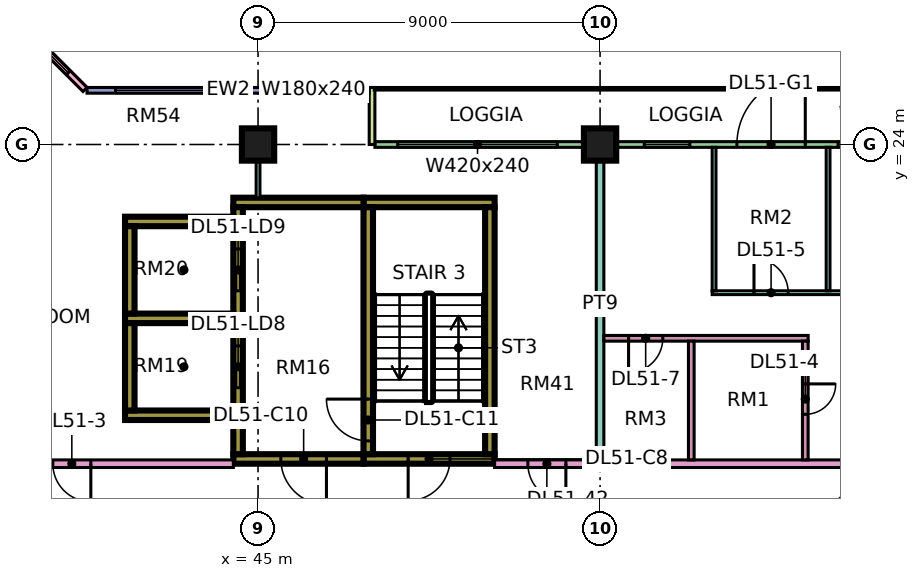
"""IFC4 building model, lengths in metres.
Left out: names, types, materials, properties, quantities, classifications, styles, units other than length and angle.
Written with IfcOpenShell. Run it as: python <this file> out.ifc"""

import sys

from ifc_helpers import new_model, si_unit, direction, frame, frame_2d, origin, origin_2d, place, context, subcontext, project, spatial, rectangle, extrude, element, fill, save


model = new_model("IFC4")
c1 = context("Model", 3, precision=1e-05, world=origin(), true_north=direction((0.0, 1.0)))
c2 = subcontext(c1, "Body", "Model", "MODEL_VIEW")
j1 = project(units=[si_unit("LENGTHUNIT", "METRE"), si_unit("PLANEANGLEUNIT", "RADIAN")], contexts=[c1])
p1 = place(None, origin())
s1 = spatial("IfcSite", under=j1, at=p1, CompositionType="ELEMENT")
p2 = place(p1, origin())
s2 = spatial("IfcBuilding", under=s1, at=p2, CompositionType="ELEMENT")
p3 = place(p2, frame((0.0, 0.0, 219.15)))
s3 = spatial("IfcBuildingStorey", under=s2, at=p3, CompositionType="ELEMENT", Elevation=219.15)
for number, where, z_axis, x_axis in (
    (1, (45.0, 24.0, 0.0), (0.0, 0.0, 1.0), (1.0, 0.0, 0.0)),
    (2, (54.0, 24.0, 0.0), (0.0, 0.0, 1.0), (1.0, 0.0, 0.0)),
):
    element("IfcColumn", number, at=place(p3, frame(where, z_axis=z_axis, x_axis=x_axis)), inside=s3, PredefinedType="COLUMN", context=c2, shape_type="SweptSolid", body=[
        extrude(rectangle(XDim=0.85, YDim=0.85, at=origin_2d()), origin(), (0.0, 0.0, 1.0), 3.75),
    ])
p4 = place(p3, frame((47.775, 15.725, 0.0), z_axis=(0.0, 0.0, 1.0), x_axis=(1.0, 0.0, 0.0)))
e3 = element("IfcWall", 3, at=p4, inside=s3, PredefinedType="SHEAR", context=c2, shape_type="SweptSolid", body=[
    extrude(rectangle(XDim=3.45, YDim=0.25, at=frame_2d((1.725, 0.0))), origin(), (0.0, 0.0, 1.0), 3.75),
])
p5 = place(p4, frame((1.175, 0.0, 0.0)))
e4 = element("IfcOpeningElement", 4, at=p5, cuts=e3, PredefinedType="OPENING", context=c2, shape_type="SweptSolid", body=[
    extrude(rectangle(XDim=1.1, YDim=2.2, at=frame_2d((0.55, 1.1))), frame((0.0, 0.135, 0.0), z_axis=(0.0, -1.0, 0.0), x_axis=(1.0, 0.0, 0.0)), (0.0, 0.0, 1.0), 0.27),
])
p6 = place(p3, frame((47.775, 22.475, 0.0), z_axis=(0.0, 0.0, 1.0), x_axis=(1.0, 0.0, 0.0)))
e5 = element("IfcWall", 5, at=p6, inside=s3, PredefinedType="SHEAR", context=c2, shape_type="SweptSolid", body=[
    extrude(rectangle(XDim=3.45, YDim=0.25, at=frame_2d((1.725, 0.0))), origin(), (0.0, 0.0, 1.0), 3.75),
])
p7 = place(p3, frame((47.9, 15.85, 0.0), z_axis=(0.0, 0.0, 1.0), x_axis=(0.0, 1.0, 0.0)))
e6 = element("IfcWall", 6, at=p7, inside=s3, PredefinedType="SHEAR", context=c2, shape_type="SweptSolid", body=[
    extrude(rectangle(XDim=6.5, YDim=0.25, at=frame_2d((3.25, 0.0))), origin(), (0.0, 0.0, 1.0), 3.75),
])
p8 = place(p7, frame((0.35, 0.0, 0.0)))
e7 = element("IfcOpeningElement", 7, at=p8, cuts=e6, PredefinedType="OPENING", context=c2, shape_type="SweptSolid", body=[
    extrude(rectangle(XDim=1.1, YDim=2.2, at=frame_2d((0.55, 1.1))), frame((0.0, 0.135, 0.0), z_axis=(0.0, -1.0, 0.0), x_axis=(1.0, 0.0, 0.0)), (0.0, 0.0, 1.0), 0.27),
])
p9 = place(p3, frame((51.1, 15.85, 0.0), z_axis=(0.0, 0.0, 1.0), x_axis=(0.0, 1.0, 0.0)))
e8 = element("IfcWall", 8, at=p9, inside=s3, PredefinedType="SHEAR", context=c2, shape_type="SweptSolid", body=[
    extrude(rectangle(XDim=6.5, YDim=0.25, at=frame_2d((3.25, 0.0))), origin(), (0.0, 0.0, 1.0), 3.75),
])
p10 = place(p3, frame((44.35, 15.725, 0.0), z_axis=(0.0, 0.0, 1.0), x_axis=(1.0, 0.0, 0.0)))
e9 = element("IfcWall", 9, at=p10, inside=s3, PredefinedType="SHEAR", context=c2, shape_type="SweptSolid", body=[
    extrude(rectangle(XDim=3.425, YDim=0.25, at=frame_2d((1.712, 0.0))), origin(), (0.0, 0.0, 1.0), 3.75),
])
p11 = place(p10, frame((1.25, 0.0, 0.0)))
e10 = element("IfcOpeningElement", 10, at=p11, cuts=e9, PredefinedType="OPENING", context=c2, shape_type="SweptSolid", body=[
    extrude(rectangle(XDim=1.2, YDim=2.2, at=frame_2d((0.6, 1.1))), frame((0.0, 0.135, 0.0), z_axis=(0.0, -1.0, 0.0), x_axis=(1.0, 0.0, 0.0)), (0.0, 0.0, 1.0), 0.27),
])
p12 = place(p3, frame((44.35, 22.475, 0.0), z_axis=(0.0, 0.0, 1.0), x_axis=(1.0, 0.0, 0.0)))
e11 = element("IfcWall", 11, at=p12, inside=s3, PredefinedType="SHEAR", context=c2, shape_type="SweptSolid", body=[
    extrude(rectangle(XDim=3.425, YDim=0.25, at=frame_2d((1.712, 0.0))), origin(), (0.0, 0.0, 1.0), 3.75),
])
p13 = place(p3, frame((44.475, 15.85, 0.0), z_axis=(0.0, 0.0, 1.0), x_axis=(0.0, 1.0, 0.0)))
e12 = element("IfcWall", 12, at=p13, inside=s3, PredefinedType="SHEAR", context=c2, shape_type="SweptSolid", body=[
    extrude(rectangle(XDim=6.5, YDim=0.25, at=frame_2d((3.25, 0.0))), origin(), (0.0, 0.0, 1.0), 3.75),
])
p14 = place(p13, frame((1.75, 0.0, 0.0)))
e13 = element("IfcOpeningElement", 13, at=p14, cuts=e12, PredefinedType="OPENING", context=c2, shape_type="SweptSolid", body=[
    extrude(rectangle(XDim=1.1, YDim=2.2, at=frame_2d((0.55, 1.1))), frame((0.0, 0.135, 0.0), z_axis=(0.0, -1.0, 0.0), x_axis=(1.0, 0.0, 0.0)), (0.0, 0.0, 1.0), 0.27),
])
p15 = place(p13, frame((4.3, 0.0, 0.0)))
e14 = element("IfcOpeningElement", 14, at=p15, cuts=e12, PredefinedType="OPENING", context=c2, shape_type="SweptSolid", body=[
    extrude(rectangle(XDim=1.1, YDim=2.2, at=frame_2d((0.55, 1.1))), frame((0.0, 0.135, 0.0), z_axis=(0.0, -1.0, 0.0), x_axis=(1.0, 0.0, 0.0)), (0.0, 0.0, 1.0), 0.27),
])
for number, where, z_axis, x_axis in (
    (15, (41.5, 16.875, 0.0), (0.0, 0.0, 1.0), (1.0, 0.0, 0.0)),
    (16, (41.5, 19.425, 0.0), (0.0, 0.0, 1.0), (1.0, 0.0, 0.0)),
    (17, (41.5, 21.975, 0.0), (0.0, 0.0, 1.0), (1.0, 0.0, 0.0)),
):
    element("IfcWall", number, at=place(p3, frame(where, z_axis=z_axis, x_axis=x_axis)), inside=s3, PredefinedType="SHEAR", context=c2, shape_type="SweptSolid", body=[
        extrude(rectangle(XDim=2.85, YDim=0.25, at=frame_2d((1.425, 0.0))), origin(), (0.0, 0.0, 1.0), 3.75),
    ])
for number, where, z_axis, x_axis in (
    (18, (41.625, 17.0, 0.0), (0.0, 0.0, 1.0), (0.0, 1.0, 0.0)),
    (19, (41.625, 19.55, 0.0), (0.0, 0.0, 1.0), (0.0, 1.0, 0.0)),
):
    element("IfcWall", number, at=place(p3, frame(where, z_axis=z_axis, x_axis=x_axis)), inside=s3, PredefinedType="SHEAR", context=c2, shape_type="SweptSolid", body=[
        extrude(rectangle(XDim=2.3, YDim=0.25, at=frame_2d((1.15, 0.0))), origin(), (0.0, 0.0, 1.0), 3.75),
    ])
p16 = place(p3, frame((61.425, 24.0, 0.0), z_axis=(0.0, 0.0, 1.0), x_axis=(-1.0, 0.0, 0.0)))
e20 = element("IfcWall", 20, at=p16, inside=s3, PredefinedType="SOLIDWALL", context=c2, shape_type="SweptSolid", body=[
    extrude(rectangle(XDim=13.35, YDim=0.15, at=frame_2d((6.675, 0.0))), origin(), (0.0, 0.0, 1.0), 3.35),
])
p17 = place(p16, frame((0.262, 0.0, 0.45)))
e21 = element("IfcOpeningElement", 21, at=p17, cuts=e20, PredefinedType="OPENING", context=c2, shape_type="SweptSolid", body=[
    extrude(rectangle(XDim=0.9, YDim=2.4, at=frame_2d((0.45, 1.2))), frame((0.0, 0.085, 0.0), z_axis=(0.0, -1.0, 0.0), x_axis=(1.0, 0.0, 0.0)), (0.0, 0.0, 1.0), 0.17),
])
p18 = place(p16, frame((2.025, 0.0, 0.0)))
e22 = element("IfcOpeningElement", 22, at=p18, cuts=e20, PredefinedType="OPENING", context=c2, shape_type="SweptSolid", body=[
    extrude(rectangle(XDim=1.8, YDim=2.4, at=frame_2d((0.9, 1.2))), frame((0.0, 0.085, 0.0), z_axis=(0.0, -1.0, 0.0), x_axis=(1.0, 0.0, 0.0)), (0.0, 0.0, 1.0), 0.17),
])
p19 = place(p16, frame((5.062, 0.0, 0.45)))
e23 = element("IfcOpeningElement", 23, at=p19, cuts=e20, PredefinedType="OPENING", context=c2, shape_type="SweptSolid", body=[
    extrude(rectangle(XDim=1.2, YDim=2.4, at=frame_2d((0.6, 1.2))), frame((0.0, 0.085, 0.0), z_axis=(0.0, -1.0, 0.0), x_axis=(1.0, 0.0, 0.0)), (0.0, 0.0, 1.0), 0.17),
])
p20 = place(p16, frame((8.55, 0.0, 0.45)))
e24 = element("IfcOpeningElement", 24, at=p20, cuts=e20, PredefinedType="OPENING", context=c2, shape_type="SweptSolid", body=[
    extrude(rectangle(XDim=4.2, YDim=2.4, at=frame_2d((2.1, 1.2))), frame((0.0, 0.085, 0.0), z_axis=(0.0, -1.0, 0.0), x_axis=(1.0, 0.0, 0.0)), (0.0, 0.0, 1.0), 0.17),
])
p21 = place(p3, frame((48.0, 25.5, 0.0), z_axis=(0.0, 0.0, 1.0), x_axis=(0.0, -1.0, 0.0)))
e25 = element("IfcWall", 25, at=p21, inside=s3, PredefinedType="SOLIDWALL", context=c2, shape_type="SweptSolid", body=[
    extrude(rectangle(XDim=1.5, YDim=0.15, at=frame_2d((0.75, 0.0))), origin(), (0.0, 0.0, 1.0), 3.35),
])
p22 = place(p3, frame((47.925, 25.425, 0.0), z_axis=(0.0, 0.0, 1.0), x_axis=(-1.0, 0.0, 0.0)))
e26 = element("IfcWall", 26, at=p22, inside=s3, PredefinedType="SOLIDWALL", context=c2, shape_type="SweptSolid", body=[
    extrude(rectangle(XDim=7.425, YDim=0.15, at=frame_2d((3.712, 0.0))), origin(), (0.0, 0.0, 1.0), 3.35),
])
p23 = place(p22, frame((0.562, 0.0, 0.45)))
e27 = element("IfcOpeningElement", 27, at=p23, cuts=e26, PredefinedType="OPENING", context=c2, shape_type="SweptSolid", body=[
    extrude(rectangle(XDim=1.8, YDim=2.4, at=frame_2d((0.9, 1.2))), frame((0.0, 0.085, 0.0), z_axis=(0.0, -1.0, 0.0), x_axis=(1.0, 0.0, 0.0)), (0.0, 0.0, 1.0), 0.17),
])
p24 = place(p22, frame((3.675, 0.0, 0.45)))
e28 = element("IfcOpeningElement", 28, at=p24, cuts=e26, PredefinedType="OPENING", context=c2, shape_type="SweptSolid", body=[
    extrude(rectangle(XDim=3.0, YDim=2.4, at=frame_2d((1.5, 1.2))), frame((0.0, 0.085, 0.0), z_axis=(0.0, -1.0, 0.0), x_axis=(1.0, 0.0, 0.0)), (0.0, 0.0, 1.0), 0.17),
])
p25 = place(p3, frame((40.447, 25.447, 0.0), z_axis=(0.0, 0.0, 1.0), x_axis=(-0.707106781187, 0.707106781187, 0.0)))
e29 = element("IfcWall", 29, at=p25, inside=s3, PredefinedType="SOLIDWALL", context=c2, shape_type="SweptSolid", body=[
    extrude(rectangle(XDim=4.243, YDim=0.15, at=frame_2d((2.121, 0.0))), origin(), (0.0, 0.0, 1.0), 3.35),
])
p26 = place(p25, frame((0.621, 0.0, 0.45)))
e30 = element("IfcOpeningElement", 30, at=p26, cuts=e29, PredefinedType="OPENING", context=c2, shape_type="SweptSolid", body=[
    extrude(rectangle(XDim=3.0, YDim=2.4, at=frame_2d((1.5, 1.2))), frame((0.0, 0.085, 0.0), z_axis=(0.0, -1.0, 0.0), x_axis=(1.0, 0.0, 0.0)), (0.0, 0.0, 1.0), 0.17),
])
p27 = place(p3, frame((34.0, 15.6, 0.0), z_axis=(0.0, 0.0, 1.0), x_axis=(1.0, 0.0, 0.0)))
e31 = element("IfcWall", 31, at=p27, inside=s3, PredefinedType="PARTITIONING", context=c2, shape_type="SweptSolid", body=[
    extrude(rectangle(XDim=10.35, YDim=0.2, at=frame_2d((5.175, 0.0))), origin(), (0.0, 0.0, 1.0), 3.35),
])
p28 = place(p27, frame((5.6, 0.0, 0.0)))
e32 = element("IfcOpeningElement", 32, at=p28, cuts=e31, PredefinedType="OPENING", context=c2, shape_type="SweptSolid", body=[
    extrude(rectangle(XDim=1.0, YDim=2.1, at=frame_2d((0.5, 1.05))), frame((0.0, 0.11, 0.0), z_axis=(0.0, -1.0, 0.0), x_axis=(1.0, 0.0, 0.0)), (0.0, 0.0, 1.0), 0.22),
])
p29 = place(p27, frame((0.45, 0.0, 0.0)))
e33 = element("IfcOpeningElement", 33, at=p29, cuts=e31, PredefinedType="OPENING", context=c2, shape_type="SweptSolid", body=[
    extrude(rectangle(XDim=1.2, YDim=2.1, at=frame_2d((0.6, 1.05))), frame((0.0, 0.11, 0.0), z_axis=(0.0, -1.0, 0.0), x_axis=(1.0, 0.0, 0.0)), (0.0, 0.0, 1.0), 0.22),
])
p30 = place(p3, frame((45.0, 22.6, 0.0), z_axis=(0.0, 0.0, 1.0), x_axis=(0.0, 1.0, 0.0)))
e34 = element("IfcWall", 34, at=p30, inside=s3, PredefinedType="PARTITIONING", context=c2, shape_type="SweptSolid", body=[
    extrude(rectangle(XDim=1.4, YDim=0.1, at=frame_2d((0.7, 0.0))), origin(), (0.0, 0.0, 1.0), 3.35),
])
p31 = place(p3, frame((51.225, 15.6, 0.0), z_axis=(0.0, 0.0, 1.0), x_axis=(1.0, 0.0, 0.0)))
e35 = element("IfcWall", 35, at=p31, inside=s3, PredefinedType="PARTITIONING", context=c2, shape_type="SweptSolid", body=[
    extrude(rectangle(XDim=13.125, YDim=0.2, at=frame_2d((6.562, 0.0))), origin(), (0.0, 0.0, 1.0), 3.35),
])
p32 = place(p31, frame((9.425, 0.0, 0.0)))
e36 = element("IfcOpeningElement", 36, at=p32, cuts=e35, PredefinedType="OPENING", context=c2, shape_type="SweptSolid", body=[
    extrude(rectangle(XDim=1.0, YDim=2.1, at=frame_2d((0.5, 1.05))), frame((0.0, 0.11, 0.0), z_axis=(0.0, -1.0, 0.0), x_axis=(1.0, 0.0, 0.0)), (0.0, 0.0, 1.0), 0.22),
])
p33 = place(p31, frame((0.875, 0.0, 0.0)))
e37 = element("IfcOpeningElement", 37, at=p33, cuts=e35, PredefinedType="OPENING", context=c2, shape_type="SweptSolid", body=[
    extrude(rectangle(XDim=1.0, YDim=2.1, at=frame_2d((0.5, 1.05))), frame((0.0, 0.11, 0.0), z_axis=(0.0, -1.0, 0.0), x_axis=(1.0, 0.0, 0.0)), (0.0, 0.0, 1.0), 0.22),
])
p34 = place(p3, frame((54.0, 15.7, 0.0), z_axis=(0.0, 0.0, 1.0), x_axis=(0.0, 1.0, 0.0)))
e38 = element("IfcWall", 38, at=p34, inside=s3, PredefinedType="PARTITIONING", context=c2, shape_type="SweptSolid", body=[
    extrude(rectangle(XDim=8.226, YDim=0.2, at=frame_2d((4.113, 0.0))), origin(), (0.0, 0.0, 1.0), 3.35),
])
p35 = place(p3, frame((54.1, 18.9, 0.0), z_axis=(0.0, 0.0, 1.0), x_axis=(1.0, 0.0, 0.0)))
e39 = element("IfcWall", 39, at=p35, inside=s3, PredefinedType="PARTITIONING", context=c2, shape_type="SweptSolid", body=[
    extrude(rectangle(XDim=5.375, YDim=0.15, at=frame_2d((2.688, 0.0))), origin(), (0.0, 0.0, 1.0), 3.35),
])
p36 = place(p35, frame((0.65, 0.0, 0.0)))
e40 = element("IfcOpeningElement", 40, at=p36, cuts=e39, PredefinedType="OPENING", context=c2, shape_type="SweptSolid", body=[
    extrude(rectangle(XDim=0.9, YDim=2.1, at=frame_2d((0.45, 1.05))), frame((0.0, 0.085, 0.0), z_axis=(0.0, -1.0, 0.0), x_axis=(1.0, 0.0, 0.0)), (0.0, 0.0, 1.0), 0.17),
])
p37 = place(p3, frame((56.4, 15.7, 0.0), z_axis=(0.0, 0.0, 1.0), x_axis=(0.0, 1.0, 0.0)))
e41 = element("IfcWall", 41, at=p37, inside=s3, PredefinedType="PARTITIONING", context=c2, shape_type="SweptSolid", body=[
    extrude(rectangle(XDim=3.125, YDim=0.15, at=frame_2d((1.562, 0.0))), origin(), (0.0, 0.0, 1.0), 3.35),
])
p38 = place(p3, frame((56.95, 20.1, 0.0), z_axis=(0.0, 0.0, 1.0), x_axis=(1.0, 0.0, 0.0)))
e42 = element("IfcWall", 42, at=p38, inside=s3, PredefinedType="PARTITIONING", context=c2, shape_type="SweptSolid", body=[
    extrude(rectangle(XDim=7.4, YDim=0.1, at=frame_2d((3.7, 0.0))), origin(), (0.0, 0.0, 1.0), 3.35),
])
p39 = place(p38, frame((1.1, 0.0, 0.0)))
e43 = element("IfcOpeningElement", 43, at=p39, cuts=e42, PredefinedType="OPENING", context=c2, shape_type="SweptSolid", body=[
    extrude(rectangle(XDim=0.9, YDim=2.1, at=frame_2d((0.45, 1.05))), frame((0.0, 0.06, 0.0), z_axis=(0.0, -1.0, 0.0), x_axis=(1.0, 0.0, 0.0)), (0.0, 0.0, 1.0), 0.12),
])
p40 = place(p38, frame((4.1, 0.0, 0.0)))
e44 = element("IfcOpeningElement", 44, at=p40, cuts=e42, PredefinedType="OPENING", context=c2, shape_type="SweptSolid", body=[
    extrude(rectangle(XDim=0.9, YDim=2.1, at=frame_2d((0.45, 1.05))), frame((0.0, 0.06, 0.0), z_axis=(0.0, -1.0, 0.0), x_axis=(1.0, 0.0, 0.0)), (0.0, 0.0, 1.0), 0.12),
])
p41 = place(p3, frame((57.0, 20.15, 0.0), z_axis=(0.0, 0.0, 1.0), x_axis=(0.0, 1.0, 0.0)))
e45 = element("IfcWall", 45, at=p41, inside=s3, PredefinedType="PARTITIONING", context=c2, shape_type="SweptSolid", body=[
    extrude(rectangle(XDim=3.776, YDim=0.1, at=frame_2d((1.888, 0.0))), origin(), (0.0, 0.0, 1.0), 3.35),
])
p42 = place(p3, frame((59.4, 15.7, 0.0), z_axis=(0.0, 0.0, 1.0), x_axis=(0.0, 1.0, 0.0)))
e46 = element("IfcWall", 46, at=p42, inside=s3, PredefinedType="PARTITIONING", context=c2, shape_type="SweptSolid", body=[
    extrude(rectangle(XDim=3.125, YDim=0.15, at=frame_2d((1.562, 0.0))), origin(), (0.0, 0.0, 1.0), 3.35),
])
p43 = place(p42, frame((1.2, 0.0, 0.0)))
e47 = element("IfcOpeningElement", 47, at=p43, cuts=e46, PredefinedType="OPENING", context=c2, shape_type="SweptSolid", body=[
    extrude(rectangle(XDim=0.8, YDim=2.1, at=frame_2d((0.4, 1.05))), frame((0.0, 0.085, 0.0), z_axis=(0.0, -1.0, 0.0), x_axis=(1.0, 0.0, 0.0)), (0.0, 0.0, 1.0), 0.17),
])
p44 = place(p3, frame((60.0, 20.15, 0.0), z_axis=(0.0, 0.0, 1.0), x_axis=(0.0, 1.0, 0.0)))
e48 = element("IfcWall", 48, at=p44, inside=s3, PredefinedType="PARTITIONING", context=c2, shape_type="SweptSolid", body=[
    extrude(rectangle(XDim=3.776, YDim=0.1, at=frame_2d((1.888, 0.0))), origin(), (0.0, 0.0, 1.0), 3.35),
])
p45 = place(p17, origin())
e49 = element("IfcWindow", 49, at=p45, inside=s3, PartitioningType="SINGLE_PANEL", PredefinedType="WINDOW", context=c2, shape_type="SweptSolid", body=[
    extrude(rectangle(XDim=0.9, YDim=2.4, at=frame_2d((0.45, 1.2))), frame((0.0, 0.03, 0.0), z_axis=(0.0, -1.0, 0.0), x_axis=(1.0, 0.0, 0.0)), (0.0, 0.0, 1.0), 0.06),
])
fill(e21, e49)
p46 = place(p18, frame((1.8, 0.0, 0.0), z_axis=(0.0, 0.0, 1.0), x_axis=(-1.0, 0.0, 0.0)))
e50 = element("IfcDoor", 50, at=p46, inside=s3, OperationType="DOUBLE_DOOR_SINGLE_SWING", PredefinedType="DOOR", context=c2, shape_type="SweptSolid", body=[
    extrude(rectangle(XDim=1.8, YDim=2.4, at=frame_2d((0.9, 1.2))), frame((0.0, 0.025, 0.0), z_axis=(0.0, -1.0, 0.0), x_axis=(1.0, 0.0, 0.0)), (0.0, 0.0, 1.0), 0.05),
])
fill(e22, e50)
p47 = place(p19, origin())
e51 = element("IfcWindow", 51, at=p47, inside=s3, PartitioningType="SINGLE_PANEL", PredefinedType="WINDOW", context=c2, shape_type="SweptSolid", body=[
    extrude(rectangle(XDim=1.2, YDim=2.4, at=frame_2d((0.6, 1.2))), frame((0.0, 0.03, 0.0), z_axis=(0.0, -1.0, 0.0), x_axis=(1.0, 0.0, 0.0)), (0.0, 0.0, 1.0), 0.06),
])
fill(e23, e51)
p48 = place(p20, origin())
e52 = element("IfcWindow", 52, at=p48, inside=s3, PartitioningType="SINGLE_PANEL", PredefinedType="WINDOW", context=c2, shape_type="SweptSolid", body=[
    extrude(rectangle(XDim=4.2, YDim=2.4, at=frame_2d((2.1, 1.2))), frame((0.0, 0.03, 0.0), z_axis=(0.0, -1.0, 0.0), x_axis=(1.0, 0.0, 0.0)), (0.0, 0.0, 1.0), 0.06),
])
fill(e24, e52)
p49 = place(p23, origin())
e53 = element("IfcWindow", 53, at=p49, inside=s3, PartitioningType="SINGLE_PANEL", PredefinedType="WINDOW", context=c2, shape_type="SweptSolid", body=[
    extrude(rectangle(XDim=1.8, YDim=2.4, at=frame_2d((0.9, 1.2))), frame((0.0, 0.03, 0.0), z_axis=(0.0, -1.0, 0.0), x_axis=(1.0, 0.0, 0.0)), (0.0, 0.0, 1.0), 0.06),
])
fill(e27, e53)
p50 = place(p24, origin())
e54 = element("IfcWindow", 54, at=p50, inside=s3, PartitioningType="SINGLE_PANEL", PredefinedType="WINDOW", context=c2, shape_type="SweptSolid", body=[
    extrude(rectangle(XDim=3.0, YDim=2.4, at=frame_2d((1.5, 1.2))), frame((0.0, 0.03, 0.0), z_axis=(0.0, -1.0, 0.0), x_axis=(1.0, 0.0, 0.0)), (0.0, 0.0, 1.0), 0.06),
])
fill(e28, e54)
p51 = place(p26, origin())
e55 = element("IfcWindow", 55, at=p51, inside=s3, PartitioningType="SINGLE_PANEL", PredefinedType="WINDOW", context=c2, shape_type="SweptSolid", body=[
    extrude(rectangle(XDim=3.0, YDim=2.4, at=frame_2d((1.5, 1.2))), frame((0.0, 0.03, 0.0), z_axis=(0.0, -1.0, 0.0), x_axis=(1.0, 0.0, 0.0)), (0.0, 0.0, 1.0), 0.06),
])
fill(e30, e55)
p52 = place(p5, frame((1.1, 0.0, 0.0), z_axis=(0.0, 0.0, 1.0), x_axis=(-1.0, 0.0, 0.0)))
e56 = element("IfcDoor", 56, at=p52, inside=s3, OperationType="SINGLE_SWING_LEFT", PredefinedType="DOOR", context=c2, shape_type="SweptSolid", body=[
    extrude(rectangle(XDim=1.1, YDim=2.2, at=frame_2d((0.55, 1.1))), frame((0.0, 0.025, 0.0), z_axis=(0.0, -1.0, 0.0), x_axis=(1.0, 0.0, 0.0)), (0.0, 0.0, 1.0), 0.05),
])
fill(e4, e56)
p53 = place(p11, origin())
e57 = element("IfcDoor", 57, at=p53, inside=s3, OperationType="SINGLE_SWING_RIGHT", PredefinedType="DOOR", context=c2, shape_type="SweptSolid", body=[
    extrude(rectangle(XDim=1.2, YDim=2.2, at=frame_2d((0.6, 1.1))), frame((0.0, 0.025, 0.0), z_axis=(0.0, -1.0, 0.0), x_axis=(1.0, 0.0, 0.0)), (0.0, 0.0, 1.0), 0.05),
])
fill(e10, e57)
p54 = place(p8, frame((1.1, 0.0, 0.0), z_axis=(0.0, 0.0, 1.0), x_axis=(-1.0, 0.0, 0.0)))
e58 = element("IfcDoor", 58, at=p54, inside=s3, OperationType="SINGLE_SWING_RIGHT", PredefinedType="DOOR", context=c2, shape_type="SweptSolid", body=[
    extrude(rectangle(XDim=1.1, YDim=2.2, at=frame_2d((0.55, 1.1))), frame((0.0, 0.025, 0.0), z_axis=(0.0, -1.0, 0.0), x_axis=(1.0, 0.0, 0.0)), (0.0, 0.0, 1.0), 0.05),
])
fill(e7, e58)
p55 = place(p14, origin())
e59 = element("IfcDoor", 59, at=p55, inside=s3, OperationType="DOUBLE_DOOR_SLIDING", PredefinedType="DOOR", context=c2, shape_type="SweptSolid", body=[
    extrude(rectangle(XDim=1.1, YDim=2.2, at=frame_2d((0.55, 1.1))), frame((0.0, 0.025, 0.0), z_axis=(0.0, -1.0, 0.0), x_axis=(1.0, 0.0, 0.0)), (0.0, 0.0, 1.0), 0.05),
])
fill(e13, e59)
p56 = place(p15, origin())
e60 = element("IfcDoor", 60, at=p56, inside=s3, OperationType="DOUBLE_DOOR_SLIDING", PredefinedType="DOOR", context=c2, shape_type="SweptSolid", body=[
    extrude(rectangle(XDim=1.1, YDim=2.2, at=frame_2d((0.55, 1.1))), frame((0.0, 0.025, 0.0), z_axis=(0.0, -1.0, 0.0), x_axis=(1.0, 0.0, 0.0)), (0.0, 0.0, 1.0), 0.05),
])
fill(e14, e60)
p57 = place(p28, origin())
e61 = element("IfcDoor", 61, at=p57, inside=s3, OperationType="SINGLE_SWING_RIGHT", PredefinedType="DOOR", context=c2, shape_type="SweptSolid", body=[
    extrude(rectangle(XDim=1.0, YDim=2.1, at=frame_2d((0.5, 1.05))), frame((0.0, 0.025, 0.0), z_axis=(0.0, -1.0, 0.0), x_axis=(1.0, 0.0, 0.0)), (0.0, 0.0, 1.0), 0.05),
])
fill(e32, e61)
p58 = place(p43, origin())
e62 = element("IfcDoor", 62, at=p58, inside=s3, OperationType="SINGLE_SWING_RIGHT", PredefinedType="DOOR", context=c2, shape_type="SweptSolid", body=[
    extrude(rectangle(XDim=0.8, YDim=2.1, at=frame_2d((0.4, 1.05))), frame((0.0, 0.025, 0.0), z_axis=(0.0, -1.0, 0.0), x_axis=(1.0, 0.0, 0.0)), (0.0, 0.0, 1.0), 0.05),
])
fill(e47, e62)
p59 = place(p39, origin())
e63 = element("IfcDoor", 63, at=p59, inside=s3, OperationType="SINGLE_SWING_LEFT", PredefinedType="DOOR", context=c2, shape_type="SweptSolid", body=[
    extrude(rectangle(XDim=0.9, YDim=2.1, at=frame_2d((0.45, 1.05))), frame((0.0, 0.025, 0.0), z_axis=(0.0, -1.0, 0.0), x_axis=(1.0, 0.0, 0.0)), (0.0, 0.0, 1.0), 0.05),
])
fill(e43, e63)
p60 = place(p36, frame((0.9, 0.0, 0.0), z_axis=(0.0, 0.0, 1.0), x_axis=(-1.0, 0.0, 0.0)))
e64 = element("IfcDoor", 64, at=p60, inside=s3, OperationType="SINGLE_SWING_LEFT", PredefinedType="DOOR", context=c2, shape_type="SweptSolid", body=[
    extrude(rectangle(XDim=0.9, YDim=2.1, at=frame_2d((0.45, 1.05))), frame((0.0, 0.025, 0.0), z_axis=(0.0, -1.0, 0.0), x_axis=(1.0, 0.0, 0.0)), (0.0, 0.0, 1.0), 0.05),
])
fill(e40, e64)
p61 = place(p33, origin())
e65 = element("IfcDoor", 65, at=p61, inside=s3, OperationType="SINGLE_SWING_RIGHT", PredefinedType="DOOR", context=c2, shape_type="SweptSolid", body=[
    extrude(rectangle(XDim=1.0, YDim=2.1, at=frame_2d((0.5, 1.05))), frame((0.0, 0.025, 0.0), z_axis=(0.0, -1.0, 0.0), x_axis=(1.0, 0.0, 0.0)), (0.0, 0.0, 1.0), 0.05),
])
fill(e37, e65)
save(model, sys.argv[1])
